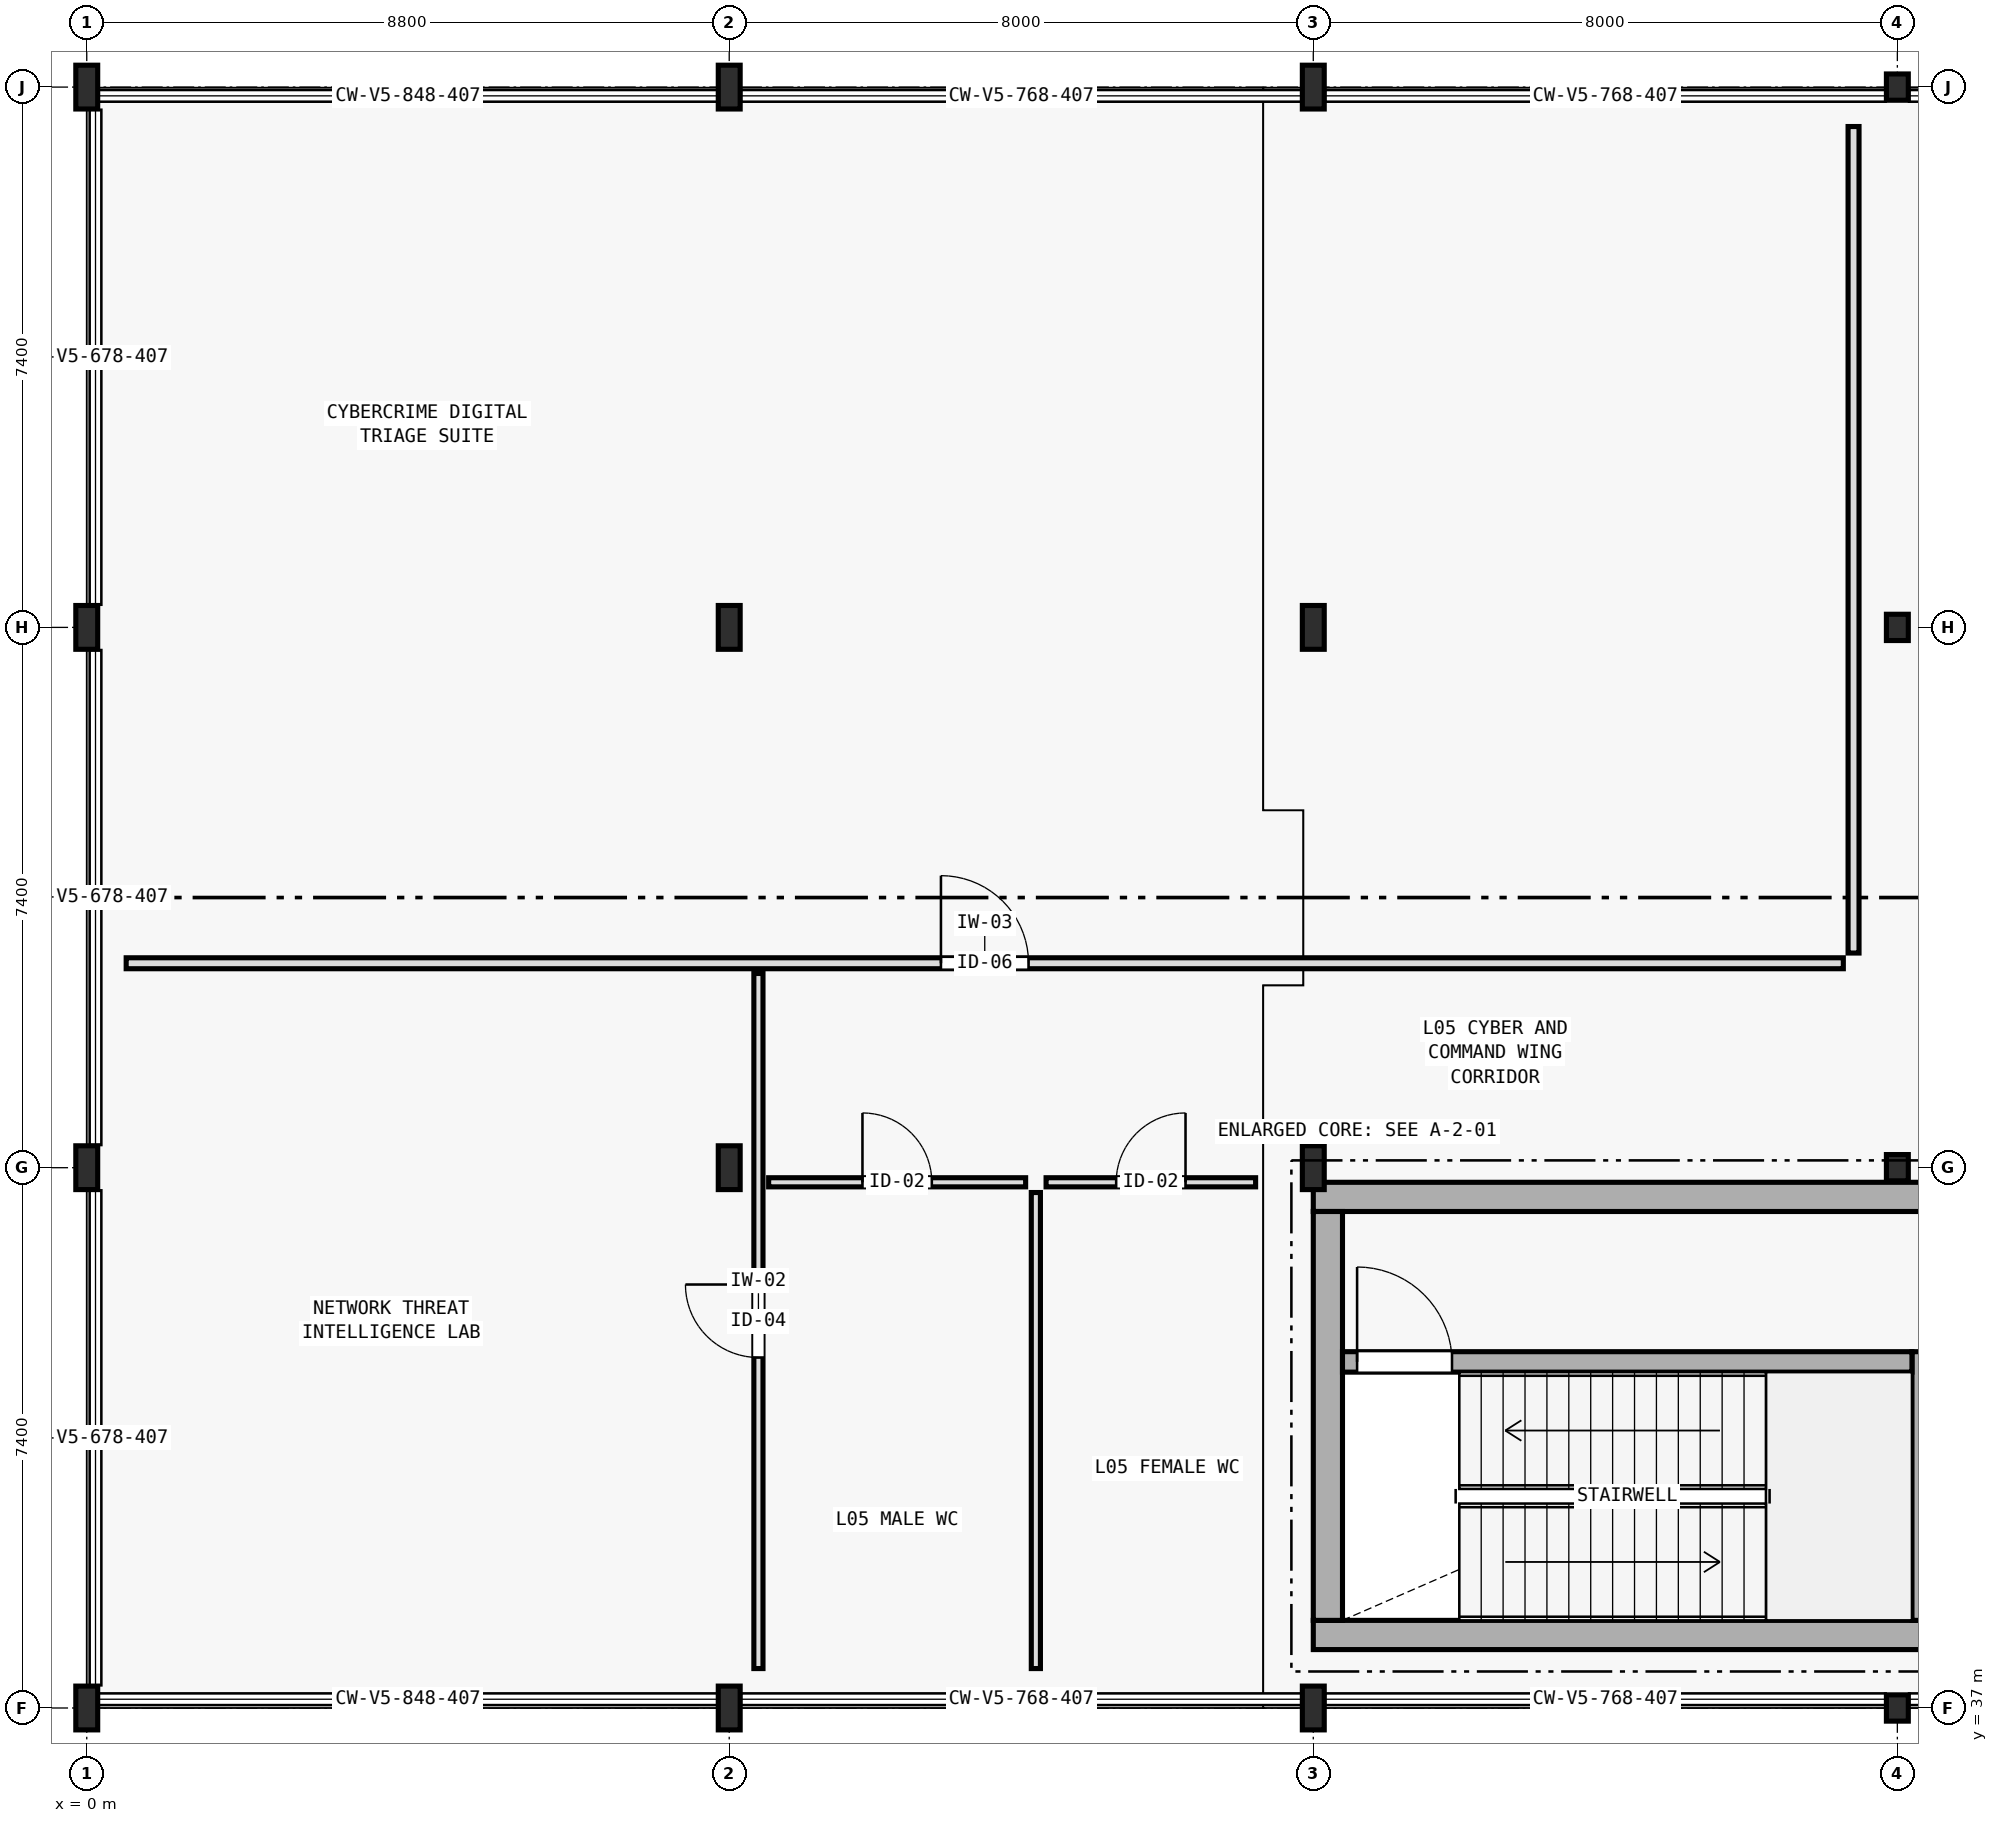
"""IFC4 building model, lengths in metres.
Left out: names, types, materials, properties, quantities, classifications, styles, units other than length and angle.
Written with IfcOpenShell. Run it as: python <this file> out.ifc"""

import sys

from ifc_helpers import new_model, si_unit, direction, frame, frame_2d, origin, origin_2d, place, context, subcontext, project, spatial, rectangle, i_section, extrude, element, fill, save


model = new_model("IFC4")
c1 = context("Model", 3, precision=1e-05, world=origin(), true_north=direction((0.0, 1.0)))
c2 = subcontext(c1, "Body", "Model", "MODEL_VIEW")
j1 = project(units=[si_unit("LENGTHUNIT", "METRE"), si_unit("PLANEANGLEUNIT", "RADIAN")], contexts=[c1])
p1 = place(None, origin())
s1 = spatial("IfcSite", under=j1, at=p1, CompositionType="ELEMENT")
p2 = place(p1, origin())
s2 = spatial("IfcBuilding", under=s1, at=p2, CompositionType="ELEMENT")
p3 = place(p2, frame((0.0, 0.0, 18.1)))
s3 = spatial("IfcBuildingStorey", under=s2, at=p3, CompositionType="ELEMENT", Elevation=18.1)
p4 = place(p3, frame((16.8, 38.0, 0.0), z_axis=(0.0, 0.0, 1.0), x_axis=(1.0, 0.0, 0.0)))
e1 = element("IfcWall", 1, at=p4, inside=s3, PredefinedType="SHEAR", context=c2, shape_type="SweptSolid", body=[
    extrude(rectangle(XDim=16.4, YDim=0.4, at=frame_2d((8.2, 0.0))), origin(), (0.0, 0.0, 1.0), 5.195),
])
p5 = place(p3, frame((16.8, 44.0, 0.0), z_axis=(0.0, 0.0, 1.0), x_axis=(1.0, 0.0, 0.0)))
e2 = element("IfcWall", 2, at=p5, inside=s3, PredefinedType="SHEAR", context=c2, shape_type="SweptSolid", body=[
    extrude(rectangle(XDim=16.4, YDim=0.4, at=frame_2d((8.2, 0.0))), origin(), (0.0, 0.0, 1.0), 5.195),
])
p6 = place(p5, frame((10.3, 0.0, 0.0)))
e3 = element("IfcOpeningElement", 3, at=p6, cuts=e2, PredefinedType="OPENING", context=c2, shape_type="SweptSolid", body=[
    extrude(rectangle(XDim=1.6, YDim=2.2, at=frame_2d((0.8, 1.1))), frame((0.0, 0.21, 0.0), z_axis=(0.0, -1.0, 0.0), x_axis=(1.0, 0.0, 0.0)), (0.0, 0.0, 1.0), 0.42),
])
p7 = place(p3, frame((17.0, 38.2, 0.0), z_axis=(0.0, 0.0, 1.0), x_axis=(0.0, 1.0, 0.0)))
e4 = element("IfcWall", 4, at=p7, inside=s3, PredefinedType="SHEAR", context=c2, shape_type="SweptSolid", body=[
    extrude(rectangle(XDim=5.6, YDim=0.4, at=frame_2d((2.8, 0.0))), origin(), (0.0, 0.0, 1.0), 5.195),
])
p8 = place(p3, frame((25.14, 38.2, 0.0), z_axis=(0.0, 0.0, 1.0), x_axis=(0.0, 1.0, 0.0)))
e5 = element("IfcWall", 5, at=p8, inside=s3, PredefinedType="SHEAR", context=c2, shape_type="SweptSolid", body=[
    extrude(rectangle(XDim=3.68, YDim=0.28, at=frame_2d((1.84, 0.0))), origin(), (0.0, 0.0, 1.0), 5.195),
])
p9 = place(p3, frame((17.2, 41.74, 0.0), z_axis=(0.0, 0.0, 1.0), x_axis=(1.0, 0.0, 0.0)))
e6 = element("IfcWall", 6, at=p9, inside=s3, PredefinedType="SHEAR", context=c2, shape_type="SweptSolid", body=[
    extrude(rectangle(XDim=7.8, YDim=0.28, at=frame_2d((3.9, 0.0))), origin(), (0.0, 0.0, 1.0), 5.195),
])
p10 = place(p9, frame((0.2, 0.0, 0.0)))
e7 = element("IfcOpeningElement", 7, at=p10, cuts=e6, PredefinedType="OPENING", context=c2, shape_type="SweptSolid", body=[
    extrude(rectangle(XDim=1.3, YDim=2.2, at=frame_2d((0.65, 1.1))), frame((0.0, 0.15, 0.0), z_axis=(0.0, -1.0, 0.0), x_axis=(1.0, 0.0, 0.0)), (0.0, 0.0, 1.0), 0.3),
])
for number, where, z_axis, x_axis in (
    (8, (0.0, 37.0, 0.0), (0.0, 0.0, 1.0), (1.0, 0.0, 0.0)),
    (9, (0.0, 44.4, 0.0), (0.0, 0.0, 1.0), (1.0, 0.0, 0.0)),
    (10, (0.0, 51.8, 0.0), (0.0, 0.0, 1.0), (1.0, 0.0, 0.0)),
    (11, (0.0, 59.2, 0.0), (0.0, 0.0, 1.0), (1.0, 0.0, 0.0)),
    (12, (8.8, 37.0, 0.0), (0.0, 0.0, 1.0), (1.0, 0.0, 0.0)),
    (13, (8.8, 44.4, 0.0), (0.0, 0.0, 1.0), (1.0, 0.0, 0.0)),
    (14, (8.8, 51.8, 0.0), (0.0, 0.0, 1.0), (1.0, 0.0, 0.0)),
    (15, (8.8, 59.2, 0.0), (0.0, 0.0, 1.0), (1.0, 0.0, 0.0)),
    (16, (16.8, 37.0, 0.0), (0.0, 0.0, 1.0), (1.0, 0.0, 0.0)),
    (17, (16.8, 44.4, 0.0), (0.0, 0.0, 1.0), (1.0, 0.0, 0.0)),
    (18, (16.8, 51.8, 0.0), (0.0, 0.0, 1.0), (1.0, 0.0, 0.0)),
    (19, (16.8, 59.2, 0.0), (0.0, 0.0, 1.0), (1.0, 0.0, 0.0)),
):
    element("IfcColumn", number, at=place(p3, frame(where, z_axis=z_axis, x_axis=x_axis)), inside=s3, PredefinedType="COLUMN", context=c2, shape_type="SweptSolid", body=[
        extrude(i_section(OverallWidth=0.3, OverallDepth=0.6, WebThickness=0.015, FlangeThickness=0.03, FilletRadius=0.027, at=origin_2d()), origin(), (0.0, 0.0, 1.0), 5.2),
    ])
for number, where, z_axis, x_axis in (
    (20, (24.8, 37.0, 0.0), (0.0, 0.0, 1.0), (1.0, 0.0, 0.0)),
    (21, (24.8, 44.4, 0.0), (0.0, 0.0, 1.0), (1.0, 0.0, 0.0)),
    (22, (24.8, 51.8, 0.0), (0.0, 0.0, 1.0), (1.0, 0.0, 0.0)),
    (23, (24.8, 59.2, 0.0), (0.0, 0.0, 1.0), (1.0, 0.0, 0.0)),
):
    element("IfcColumn", number, at=place(p3, frame(where, z_axis=z_axis, x_axis=x_axis)), inside=s3, PredefinedType="COLUMN", context=c2, shape_type="SweptSolid", body=[
        extrude(i_section(OverallWidth=0.3, OverallDepth=0.36, WebThickness=0.012, FlangeThickness=0.022, FilletRadius=0.027, at=origin_2d()), origin(), (0.0, 0.0, 1.0), 5.2),
    ])
p11 = place(p3, frame((0.54, 47.2, 0.0), z_axis=(0.0, 0.0, 1.0), x_axis=(1.0, 0.0, 0.0)))
e24 = element("IfcWall", 24, at=p11, inside=s3, PredefinedType="PARTITIONING", context=c2, shape_type="SweptSolid", body=[
    extrude(rectangle(XDim=23.52, YDim=0.15, at=frame_2d((11.76, 0.0))), origin(), (0.0, 0.0, 1.0), 4.51),
])
p12 = place(p11, frame((11.16, 0.0, 0.0)))
e25 = element("IfcOpeningElement", 25, at=p12, cuts=e24, PredefinedType="OPENING", context=c2, shape_type="SweptSolid", body=[
    extrude(rectangle(XDim=1.2, YDim=2.2, at=frame_2d((0.6, 1.1))), frame((0.0, 0.085, 0.0), z_axis=(0.0, -1.0, 0.0), x_axis=(1.0, 0.0, 0.0)), (0.0, 0.0, 1.0), 0.17),
])
p13 = place(p3, frame((24.2, 47.34, 0.0), z_axis=(0.0, 0.0, 1.0), x_axis=(0.0, 1.0, 0.0)))
e26 = element("IfcWall", 26, at=p13, inside=s3, PredefinedType="PARTITIONING", context=c2, shape_type="SweptSolid", body=[
    extrude(rectangle(XDim=11.32, YDim=0.15, at=frame_2d((5.66, 0.0))), origin(), (0.0, 0.0, 1.0), 4.06),
])
p14 = place(p3, frame((9.2, 37.54, 0.0), z_axis=(0.0, 0.0, 1.0), x_axis=(0.0, 1.0, 0.0)))
e27 = element("IfcWall", 27, at=p14, inside=s3, PredefinedType="PARTITIONING", context=c2, shape_type="SweptSolid", body=[
    extrude(rectangle(XDim=9.52, YDim=0.125, at=frame_2d((4.76, 0.0))), origin(), (0.0, 0.0, 1.0), 4.06),
])
p15 = place(p14, frame((4.26, 0.0, 0.0)))
e28 = element("IfcOpeningElement", 28, at=p15, cuts=e27, PredefinedType="OPENING", context=c2, shape_type="SweptSolid", body=[
    extrude(rectangle(XDim=1.0, YDim=2.2, at=frame_2d((0.5, 1.1))), frame((0.0, 0.073, 0.0), z_axis=(0.0, -1.0, 0.0), x_axis=(1.0, 0.0, 0.0)), (0.0, 0.0, 1.0), 0.145),
])
p16 = place(p3, frame((9.34, 44.2, 0.0), z_axis=(0.0, 0.0, 1.0), x_axis=(1.0, 0.0, 0.0)))
e29 = element("IfcWall", 29, at=p16, inside=s3, PredefinedType="PARTITIONING", context=c2, shape_type="SweptSolid", body=[
    extrude(rectangle(XDim=3.52, YDim=0.125, at=frame_2d((1.76, 0.0))), origin(), (0.0, 0.0, 1.0), 4.06),
])
p17 = place(p16, frame((1.285, 0.0, 0.0)))
e30 = element("IfcOpeningElement", 30, at=p17, cuts=e29, PredefinedType="OPENING", context=c2, shape_type="SweptSolid", body=[
    extrude(rectangle(XDim=0.95, YDim=2.1, at=frame_2d((0.475, 1.05))), frame((0.0, 0.073, 0.0), z_axis=(0.0, -1.0, 0.0), x_axis=(1.0, 0.0, 0.0)), (0.0, 0.0, 1.0), 0.145),
])
p18 = place(p3, frame((13.0, 37.54, 0.0), z_axis=(0.0, 0.0, 1.0), x_axis=(0.0, 1.0, 0.0)))
e31 = element("IfcWall", 31, at=p18, inside=s3, PredefinedType="PARTITIONING", context=c2, shape_type="SweptSolid", body=[
    extrude(rectangle(XDim=6.52, YDim=0.125, at=frame_2d((3.26, 0.0))), origin(), (0.0, 0.0, 1.0), 4.87),
])
p19 = place(p3, frame((13.14, 44.2, 0.0), z_axis=(0.0, 0.0, 1.0), x_axis=(1.0, 0.0, 0.0)))
e32 = element("IfcWall", 32, at=p19, inside=s3, PredefinedType="PARTITIONING", context=c2, shape_type="SweptSolid", body=[
    extrude(rectangle(XDim=2.87, YDim=0.125, at=frame_2d((1.435, 0.0))), origin(), (0.0, 0.0, 1.0), 4.06),
])
p20 = place(p19, frame((0.96, 0.0, 0.0)))
e33 = element("IfcOpeningElement", 33, at=p20, cuts=e32, PredefinedType="OPENING", context=c2, shape_type="SweptSolid", body=[
    extrude(rectangle(XDim=0.95, YDim=2.1, at=frame_2d((0.475, 1.05))), frame((0.0, 0.073, 0.0), z_axis=(0.0, -1.0, 0.0), x_axis=(1.0, 0.0, 0.0)), (0.0, 0.0, 1.0), 0.145),
])
p21 = place(p10, origin())
e34 = element("IfcDoor", 34, at=p21, inside=s3, OperationType="SINGLE_SWING_LEFT", PredefinedType="DOOR", context=c2, shape_type="SweptSolid", body=[
    extrude(rectangle(XDim=1.3, YDim=2.2, at=frame_2d((0.65, 1.1))), frame((0.0, 0.025, 0.0), z_axis=(0.0, -1.0, 0.0), x_axis=(1.0, 0.0, 0.0)), (0.0, 0.0, 1.0), 0.05),
])
fill(e7, e34)
p22 = place(p12, origin())
e35 = element("IfcDoor", 35, at=p22, inside=s3, OperationType="SINGLE_SWING_LEFT", PredefinedType="DOOR", context=c2, shape_type="SweptSolid", body=[
    extrude(rectangle(XDim=1.2, YDim=2.2, at=frame_2d((0.6, 1.1))), frame((0.0, 0.025, 0.0), z_axis=(0.0, -1.0, 0.0), x_axis=(1.0, 0.0, 0.0)), (0.0, 0.0, 1.0), 0.05),
])
fill(e25, e35)
p23 = place(p15, origin())
e36 = element("IfcDoor", 36, at=p23, inside=s3, OperationType="SINGLE_SWING_RIGHT", PredefinedType="DOOR", context=c2, shape_type="SweptSolid", body=[
    extrude(rectangle(XDim=1.0, YDim=2.2, at=frame_2d((0.5, 1.1))), frame((0.0, 0.025, 0.0), z_axis=(0.0, -1.0, 0.0), x_axis=(1.0, 0.0, 0.0)), (0.0, 0.0, 1.0), 0.05),
])
fill(e28, e36)
p24 = place(p17, origin())
e37 = element("IfcDoor", 37, at=p24, inside=s3, OperationType="SINGLE_SWING_LEFT", PredefinedType="DOOR", context=c2, shape_type="SweptSolid", body=[
    extrude(rectangle(XDim=0.95, YDim=2.1, at=frame_2d((0.475, 1.05))), frame((0.0, 0.025, 0.0), z_axis=(0.0, -1.0, 0.0), x_axis=(1.0, 0.0, 0.0)), (0.0, 0.0, 1.0), 0.05),
])
fill(e30, e37)
p25 = place(p20, origin())
e38 = element("IfcDoor", 38, at=p25, inside=s3, OperationType="SINGLE_SWING_RIGHT", PredefinedType="DOOR", context=c2, shape_type="SweptSolid", body=[
    extrude(rectangle(XDim=0.95, YDim=2.1, at=frame_2d((0.475, 1.05))), frame((0.0, 0.025, 0.0), z_axis=(0.0, -1.0, 0.0), x_axis=(1.0, 0.0, 0.0)), (0.0, 0.0, 1.0), 0.05),
])
fill(e33, e38)
save(model, sys.argv[1])
